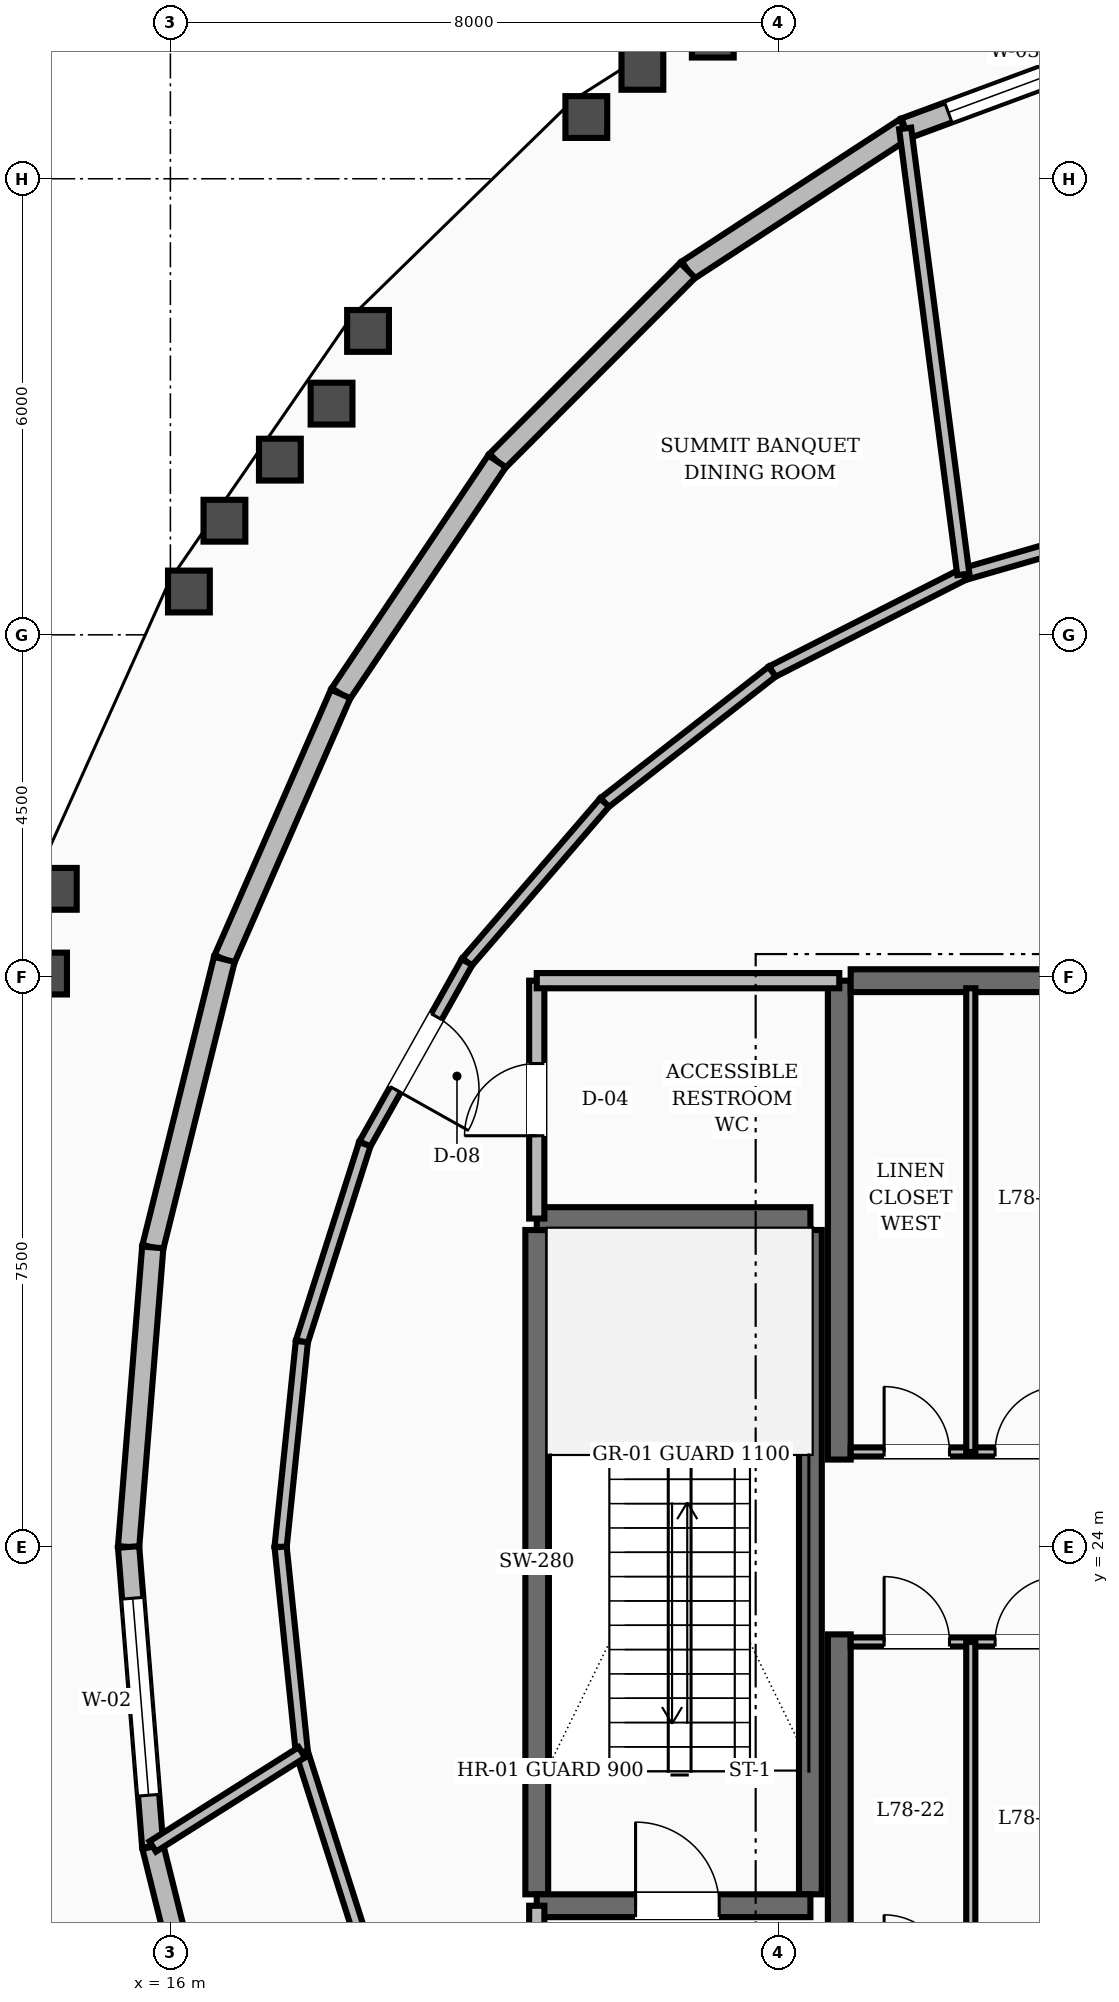
"""IFC4 building model, lengths in metres.
Left out: names, types, materials, properties, quantities, classifications, styles, units other than length and angle.
Written with IfcOpenShell. Run it as: python <this file> out.ifc"""

import sys

from ifc_helpers import new_model, si_unit, direction, frame, frame_2d, origin, place, context, subcontext, project, spatial, rectangle, extrude, element, fill, save


model = new_model("IFC4")
c1 = context("Model", 3, precision=1e-05, world=origin(), true_north=direction((0.0, 1.0)))
c2 = subcontext(c1, "Body", "Model", "MODEL_VIEW")
j1 = project(units=[si_unit("LENGTHUNIT", "METRE"), si_unit("PLANEANGLEUNIT", "RADIAN")], contexts=[c1])
p1 = place(None, origin())
s1 = spatial("IfcSite", under=j1, at=p1, CompositionType="ELEMENT")
p2 = place(p1, origin())
s2 = spatial("IfcBuilding", under=s1, at=p2, CompositionType="ELEMENT")
p3 = place(p2, frame((0.0, 0.0, 297.6)))
s3 = spatial("IfcBuildingStorey", under=s2, at=p3, CompositionType="ELEMENT", Elevation=297.6)
for number, where, z_axis, x_axis in (
    (1, (24.8, 16.55, 0.0), (0.0, 0.0, 1.0), (0.0, 1.0, 0.0)),
    (2, (24.8, 25.15, 0.0), (0.0, 0.0, 1.0), (0.0, 1.0, 0.0)),
):
    element("IfcWall", number, at=place(p3, frame(where, z_axis=z_axis, x_axis=x_axis)), inside=s3, PredefinedType="SHEAR", context=c2, shape_type="SweptSolid", body=[
        extrude(rectangle(XDim=6.3, YDim=0.3, at=frame_2d((3.15, 0.0))), origin(), (0.0, 0.0, 1.0), 4.8),
    ])
p4 = place(p3, frame((24.95, 31.45, 0.0), z_axis=(0.0, 0.0, 1.0), x_axis=(1.0, 0.0, 0.0)))
e3 = element("IfcWall", 3, at=p4, inside=s3, PredefinedType="SHEAR", context=c2, shape_type="SweptSolid", body=[
    extrude(rectangle(XDim=3.25, YDim=0.3, at=frame_2d((1.625, 0.0))), origin(), (0.0, 0.0, 1.0), 4.8),
])
for number, where, z_axis, x_axis in (
    (4, (20.82, 19.43, 0.0), (0.0, 0.0, 1.0), (0.0, 1.0, 0.0)),
    (5, (24.42, 19.43, 0.0), (0.0, 0.0, 1.0), (0.0, 1.0, 0.0)),
):
    element("IfcWall", number, at=place(p3, frame(where, z_axis=z_axis, x_axis=x_axis)), inside=s3, PredefinedType="SHEAR", context=c2, shape_type="SweptSolid", body=[
        extrude(rectangle(XDim=8.74, YDim=0.3, at=frame_2d((4.37, 0.0))), origin(), (0.0, 0.0, 1.0), 4.8),
    ])
p5 = place(p3, frame((20.82, 19.28, 0.0), z_axis=(0.0, 0.0, 1.0), x_axis=(1.0, 0.0, 0.0)))
e6 = element("IfcWall", 6, at=p5, inside=s3, PredefinedType="SHEAR", context=c2, shape_type="SweptSolid", body=[
    extrude(rectangle(XDim=3.6, YDim=0.3, at=frame_2d((1.8, 0.0))), origin(), (0.0, 0.0, 1.0), 4.8),
])
p6 = place(p5, frame((1.3, 0.0, 0.0)))
e7 = element("IfcOpeningElement", 7, at=p6, cuts=e6, PredefinedType="OPENING", context=c2, shape_type="SweptSolid", body=[
    extrude(rectangle(XDim=1.1, YDim=2.1, at=frame_2d((0.55, 1.05))), frame((0.0, 0.16, 0.0), z_axis=(0.0, -1.0, 0.0), x_axis=(1.0, 0.0, 0.0)), (0.0, 0.0, 1.0), 0.32),
])
p7 = place(p3, frame((20.82, 28.32, 0.0), z_axis=(0.0, 0.0, 1.0), x_axis=(1.0, 0.0, 0.0)))
e8 = element("IfcWall", 8, at=p7, inside=s3, PredefinedType="SHEAR", context=c2, shape_type="SweptSolid", body=[
    extrude(rectangle(XDim=3.6, YDim=0.3, at=frame_2d((1.8, 0.0))), origin(), (0.0, 0.0, 1.0), 4.8),
])
p8 = place(p3, frame((28.771, 43.812, 0.0), z_axis=(0.0, 0.0, 1.0), x_axis=(-0.937772775671, -0.347249508582, 0.0)))
e9 = element("IfcWall", 9, at=p8, inside=s3, PredefinedType="STANDARD", context=c2, shape_type="SweptSolid", body=[
    extrude(rectangle(XDim=3.311, YDim=0.28, at=frame_2d((1.655, 0.0))), origin(), (0.0, 0.0, 1.0), 3.71),
])
p9 = place(p8, frame((0.605, 0.0, 0.8)))
e10 = element("IfcOpeningElement", 10, at=p9, cuts=e9, PredefinedType="OPENING", context=c2, shape_type="SweptSolid", body=[
    extrude(rectangle(XDim=2.1, YDim=1.65, at=frame_2d((1.05, 0.825))), frame((0.0, 0.15, 0.0), z_axis=(0.0, -1.0, 0.0), x_axis=(1.0, 0.0, 0.0)), (0.0, 0.0, 1.0), 0.3),
])
p10 = place(p3, frame((25.667, 42.662, 0.0), z_axis=(0.0, 0.0, 1.0), x_axis=(-0.837506795295, -0.546426909875, 0.0)))
e11 = element("IfcWall", 11, at=p10, inside=s3, PredefinedType="STANDARD", context=c2, shape_type="SweptSolid", body=[
    extrude(rectangle(XDim=3.416, YDim=0.28, at=frame_2d((1.708, 0.0))), origin(), (0.0, 0.0, 1.0), 3.71),
])
p11 = place(p3, frame((22.805, 40.796, 0.0), z_axis=(0.0, 0.0, 1.0), x_axis=(-0.706556343152, -0.707656791073, 0.0)))
e12 = element("IfcWall", 12, at=p11, inside=s3, PredefinedType="STANDARD", context=c2, shape_type="SweptSolid", body=[
    extrude(rectangle(XDim=3.55, YDim=0.28, at=frame_2d((1.775, 0.0))), origin(), (0.0, 0.0, 1.0), 3.71),
])
p12 = place(p3, frame((20.297, 38.284, 0.0), z_axis=(0.0, 0.0, 1.0), x_axis=(-0.55793393731, -0.82988536654, 0.0)))
e13 = element("IfcWall", 13, at=p12, inside=s3, PredefinedType="STANDARD", context=c2, shape_type="SweptSolid", body=[
    extrude(rectangle(XDim=3.689, YDim=0.28, at=frame_2d((1.844, 0.0))), origin(), (0.0, 0.0, 1.0), 3.71),
])
p13 = place(p3, frame((18.239, 35.222, 0.0), z_axis=(0.0, 0.0, 1.0), x_axis=(-0.401195046879, -0.91599264973, 0.0)))
e14 = element("IfcWall", 14, at=p13, inside=s3, PredefinedType="STANDARD", context=c2, shape_type="SweptSolid", body=[
    extrude(rectangle(XDim=3.812, YDim=0.28, at=frame_2d((1.906, 0.0))), origin(), (0.0, 0.0, 1.0), 3.71),
])
p14 = place(p3, frame((16.71, 31.73, 0.0), z_axis=(0.0, 0.0, 1.0), x_axis=(-0.241167143082, -0.970483595481, 0.0)))
e15 = element("IfcWall", 15, at=p14, inside=s3, PredefinedType="STANDARD", context=c2, shape_type="SweptSolid", body=[
    extrude(rectangle(XDim=3.905, YDim=0.28, at=frame_2d((1.952, 0.0))), origin(), (0.0, 0.0, 1.0), 3.71),
])
p15 = place(p3, frame((15.768, 27.941, 0.0), z_axis=(0.0, 0.0, 1.0), x_axis=(-0.080459393336, -0.996757887365, 0.0)))
e16 = element("IfcWall", 16, at=p15, inside=s3, PredefinedType="STANDARD", context=c2, shape_type="SweptSolid", body=[
    extrude(rectangle(XDim=3.954, YDim=0.28, at=frame_2d((1.977, 0.0))), origin(), (0.0, 0.0, 1.0), 3.71),
])
p16 = place(p3, frame((15.45, 24.0, 0.0), z_axis=(0.0, 0.0, 1.0), x_axis=(0.080459393336, -0.996757887365, 0.0)))
e17 = element("IfcWall", 17, at=p16, inside=s3, PredefinedType="STANDARD", context=c2, shape_type="SweptSolid", body=[
    extrude(rectangle(XDim=3.954, YDim=0.28, at=frame_2d((1.977, 0.0))), origin(), (0.0, 0.0, 1.0), 3.71),
])
p17 = place(p16, frame((0.677, 0.0, 0.8)))
e18 = element("IfcOpeningElement", 18, at=p17, cuts=e17, PredefinedType="OPENING", context=c2, shape_type="SweptSolid", body=[
    extrude(rectangle(XDim=2.6, YDim=1.65, at=frame_2d((1.3, 0.825))), frame((0.0, 0.15, 0.0), z_axis=(0.0, -1.0, 0.0), x_axis=(1.0, 0.0, 0.0)), (0.0, 0.0, 1.0), 0.3),
])
p18 = place(p3, frame((15.768, 20.059, 0.0), z_axis=(0.0, 0.0, 1.0), x_axis=(0.241167143082, -0.970483595481, 0.0)))
e19 = element("IfcWall", 19, at=p18, inside=s3, PredefinedType="STANDARD", context=c2, shape_type="SweptSolid", body=[
    extrude(rectangle(XDim=3.905, YDim=0.28, at=frame_2d((1.952, 0.0))), origin(), (0.0, 0.0, 1.0), 3.71),
])
p19 = place(p3, frame((20.82, 16.55, 0.0), z_axis=(0.0, 0.0, 1.0), x_axis=(0.0, 1.0, 0.0)))
e20 = element("IfcWall", 20, at=p19, inside=s3, PredefinedType="SOLIDWALL", context=c2, shape_type="SweptSolid", body=[
    extrude(rectangle(XDim=2.73, YDim=0.2, at=frame_2d((1.365, 0.0))), origin(), (0.0, 0.0, 1.0), 3.71),
])
p20 = place(p19, frame((0.815, 0.0, 0.0)))
e21 = element("IfcOpeningElement", 21, at=p20, cuts=e20, PredefinedType="OPENING", context=c2, shape_type="SweptSolid", body=[
    extrude(rectangle(XDim=1.1, YDim=2.1, at=frame_2d((0.55, 1.05))), frame((0.0, 0.11, 0.0), z_axis=(0.0, -1.0, 0.0), x_axis=(1.0, 0.0, 0.0)), (0.0, 0.0, 1.0), 0.22),
])
p21 = place(p3, frame((20.82, 28.32, 0.0), z_axis=(0.0, 0.0, 1.0), x_axis=(0.0, 1.0, 0.0)))
e22 = element("IfcWall", 22, at=p21, inside=s3, PredefinedType="SOLIDWALL", context=c2, shape_type="SweptSolid", body=[
    extrude(rectangle(XDim=3.13, YDim=0.2, at=frame_2d((1.565, 0.0))), origin(), (0.0, 0.0, 1.0), 3.71),
])
p22 = place(p21, frame((1.09, 0.0, 0.0)))
e23 = element("IfcOpeningElement", 23, at=p22, cuts=e22, PredefinedType="OPENING", context=c2, shape_type="SweptSolid", body=[
    extrude(rectangle(XDim=0.95, YDim=2.1, at=frame_2d((0.475, 1.05))), frame((0.0, 0.11, 0.0), z_axis=(0.0, -1.0, 0.0), x_axis=(1.0, 0.0, 0.0)), (0.0, 0.0, 1.0), 0.22),
])
p23 = place(p3, frame((20.82, 31.45, 0.0), z_axis=(0.0, 0.0, 1.0), x_axis=(1.0, 0.0, 0.0)))
e24 = element("IfcWall", 24, at=p23, inside=s3, PredefinedType="SOLIDWALL", context=c2, shape_type="SweptSolid", body=[
    extrude(rectangle(XDim=3.98, YDim=0.2, at=frame_2d((1.99, 0.0))), origin(), (0.0, 0.0, 1.0), 3.71),
])
p24 = place(p3, frame((24.95, 25.25, 0.0), z_axis=(0.0, 0.0, 1.0), x_axis=(1.0, 0.0, 0.0)))
e25 = element("IfcWall", 25, at=p24, inside=s3, PredefinedType="PARTITIONING", context=c2, shape_type="SweptSolid", body=[
    extrude(rectangle(XDim=3.2, YDim=0.12, at=frame_2d((1.6, 0.0))), origin(), (0.0, 0.0, 1.0), 3.71),
])
p25 = place(p24, frame((0.44, 0.0, 0.0)))
e26 = element("IfcOpeningElement", 26, at=p25, cuts=e25, PredefinedType="OPENING", context=c2, shape_type="SweptSolid", body=[
    extrude(rectangle(XDim=0.86, YDim=2.1, at=frame_2d((0.43, 1.05))), frame((0.0, 0.07, 0.0), z_axis=(0.0, -1.0, 0.0), x_axis=(1.0, 0.0, 0.0)), (0.0, 0.0, 1.0), 0.14),
])
p26 = place(p24, frame((1.9, 0.0, 0.0)))
e27 = element("IfcOpeningElement", 27, at=p26, cuts=e25, PredefinedType="OPENING", context=c2, shape_type="SweptSolid", body=[
    extrude(rectangle(XDim=0.86, YDim=2.1, at=frame_2d((0.43, 1.05))), frame((0.0, 0.07, 0.0), z_axis=(0.0, -1.0, 0.0), x_axis=(1.0, 0.0, 0.0)), (0.0, 0.0, 1.0), 0.14),
])
p27 = place(p3, frame((24.95, 22.75, 0.0), z_axis=(0.0, 0.0, 1.0), x_axis=(1.0, 0.0, 0.0)))
e28 = element("IfcWall", 28, at=p27, inside=s3, PredefinedType="PARTITIONING", context=c2, shape_type="SweptSolid", body=[
    extrude(rectangle(XDim=3.2, YDim=0.12, at=frame_2d((1.6, 0.0))), origin(), (0.0, 0.0, 1.0), 3.71),
])
p28 = place(p27, frame((0.44, 0.0, 0.0)))
e29 = element("IfcOpeningElement", 29, at=p28, cuts=e28, PredefinedType="OPENING", context=c2, shape_type="SweptSolid", body=[
    extrude(rectangle(XDim=0.86, YDim=2.1, at=frame_2d((0.43, 1.05))), frame((0.0, 0.07, 0.0), z_axis=(0.0, -1.0, 0.0), x_axis=(1.0, 0.0, 0.0)), (0.0, 0.0, 1.0), 0.14),
])
p29 = place(p27, frame((1.9, 0.0, 0.0)))
e30 = element("IfcOpeningElement", 30, at=p29, cuts=e28, PredefinedType="OPENING", context=c2, shape_type="SweptSolid", body=[
    extrude(rectangle(XDim=0.86, YDim=2.1, at=frame_2d((0.43, 1.05))), frame((0.0, 0.07, 0.0), z_axis=(0.0, -1.0, 0.0), x_axis=(1.0, 0.0, 0.0)), (0.0, 0.0, 1.0), 0.14),
])
p30 = place(p3, frame((26.53, 25.25, 0.0), z_axis=(0.0, 0.0, 1.0), x_axis=(0.0, 1.0, 0.0)))
e31 = element("IfcWall", 31, at=p30, inside=s3, PredefinedType="PARTITIONING", context=c2, shape_type="SweptSolid", body=[
    extrude(rectangle(XDim=6.1, YDim=0.12, at=frame_2d((3.05, 0.0))), origin(), (0.0, 0.0, 1.0), 3.71),
])
p31 = place(p3, frame((26.53, 18.3, 0.0), z_axis=(0.0, 0.0, 1.0), x_axis=(0.0, 1.0, 0.0)))
e32 = element("IfcWall", 32, at=p31, inside=s3, PredefinedType="PARTITIONING", context=c2, shape_type="SweptSolid", body=[
    extrude(rectangle(XDim=4.45, YDim=0.12, at=frame_2d((2.225, 0.0))), origin(), (0.0, 0.0, 1.0), 3.71),
])
p32 = place(p3, frame((29.161, 37.584, 0.0), z_axis=(0.0, 0.0, 1.0), x_axis=(-0.96073200199, -0.277477963723, 0.0)))
e33 = element("IfcWall", 33, at=p32, inside=s3, PredefinedType="SOLIDWALL", context=c2, shape_type="SweptSolid", body=[
    extrude(rectangle(XDim=2.841, YDim=0.16, at=frame_2d((1.42, 0.0))), origin(), (0.0, 0.0, 1.0), 3.71),
])
p33 = place(p3, frame((26.432, 36.796, 0.0), z_axis=(0.0, 0.0, 1.0), x_axis=(-0.891273737135, -0.453465682817, 0.0)))
e34 = element("IfcWall", 34, at=p33, inside=s3, PredefinedType="SOLIDWALL", context=c2, shape_type="SweptSolid", body=[
    extrude(rectangle(XDim=2.822, YDim=0.16, at=frame_2d((1.411, 0.0))), origin(), (0.0, 0.0, 1.0), 3.71),
])
p34 = place(p3, frame((23.917, 35.516, 0.0), z_axis=(0.0, 0.0, 1.0), x_axis=(-0.788044217139, -0.615618641558, 0.0)))
e35 = element("IfcWall", 35, at=p34, inside=s3, PredefinedType="SOLIDWALL", context=c2, shape_type="SweptSolid", body=[
    extrude(rectangle(XDim=2.798, YDim=0.16, at=frame_2d((1.399, 0.0))), origin(), (0.0, 0.0, 1.0), 3.71),
])
p35 = place(p3, frame((21.712, 33.793, 0.0), z_axis=(0.0, 0.0, 1.0), x_axis=(-0.652979703778, -0.757375406555, 0.0)))
e36 = element("IfcWall", 36, at=p35, inside=s3, PredefinedType="SOLIDWALL", context=c2, shape_type="SweptSolid", body=[
    extrude(rectangle(XDim=2.771, YDim=0.16, at=frame_2d((1.386, 0.0))), origin(), (0.0, 0.0, 1.0), 3.71),
])
p36 = place(p3, frame((19.902, 31.695, 0.0), z_axis=(0.0, 0.0, 1.0), x_axis=(-0.48962370511, -0.871933843474, 0.0)))
e37 = element("IfcWall", 37, at=p36, inside=s3, PredefinedType="SOLIDWALL", context=c2, shape_type="SweptSolid", body=[
    extrude(rectangle(XDim=2.746, YDim=0.16, at=frame_2d((1.373, 0.0))), origin(), (0.0, 0.0, 1.0), 3.71),
])
p37 = place(p36, frame((0.823, 0.0, 0.0)))
e38 = element("IfcOpeningElement", 38, at=p37, cuts=e37, PredefinedType="OPENING", context=c2, shape_type="SweptSolid", body=[
    extrude(rectangle(XDim=1.1, YDim=2.1, at=frame_2d((0.55, 1.05))), frame((0.0, 0.09, 0.0), z_axis=(0.0, -1.0, 0.0), x_axis=(1.0, 0.0, 0.0)), (0.0, 0.0, 1.0), 0.18),
])
p38 = place(p3, frame((18.558, 29.3, 0.0), z_axis=(0.0, 0.0, 1.0), x_axis=(-0.303658118342, -0.952781059407, 0.0)))
e39 = element("IfcWall", 39, at=p38, inside=s3, PredefinedType="SOLIDWALL", context=c2, shape_type="SweptSolid", body=[
    extrude(rectangle(XDim=2.727, YDim=0.16, at=frame_2d((1.364, 0.0))), origin(), (0.0, 0.0, 1.0), 3.71),
])
for number, where, z_axis, x_axis in (
    (40, (17.729, 26.702, 0.0), (0.0, 0.0, 1.0), (-0.103, -0.995, 0.0)),
    (41, (17.45, 24.0, 0.0), (0.0, 0.0, 1.0), (0.103, -0.995, 0.0)),
):
    element("IfcWall", number, at=place(p3, frame(where, z_axis=z_axis, x_axis=x_axis)), inside=s3, PredefinedType="SOLIDWALL", context=c2, shape_type="SweptSolid", body=[
        extrude(rectangle(XDim=2.716, YDim=0.16, at=frame_2d((1.358, 0.0))), origin(), (0.0, 0.0, 1.0), 3.71),
    ])
p39 = place(p3, frame((17.729, 21.298, 0.0), z_axis=(0.0, 0.0, 1.0), x_axis=(0.303658118342, -0.952781059407, 0.0)))
e42 = element("IfcWall", 42, at=p39, inside=s3, PredefinedType="SOLIDWALL", context=c2, shape_type="SweptSolid", body=[
    extrude(rectangle(XDim=2.727, YDim=0.16, at=frame_2d((1.364, 0.0))), origin(), (0.0, 0.0, 1.0), 3.71),
])
p40 = place(p3, frame((26.432, 36.796, 0.0), z_axis=(0.0, 0.0, 1.0), x_axis=(-0.129365645752, 0.991596959303, 0.0)))
e43 = element("IfcWall", 43, at=p40, inside=s3, PredefinedType="SOLIDWALL", context=c2, shape_type="SweptSolid", body=[
    extrude(rectangle(XDim=5.917, YDim=0.16, at=frame_2d((2.958, 0.0))), origin(), (0.0, 0.0, 1.0), 3.71),
])
p41 = place(p3, frame((17.729, 21.298, 0.0), z_axis=(0.0, 0.0, 1.0), x_axis=(-0.845446390163, -0.534060297495, 0.0)))
e44 = element("IfcWall", 44, at=p41, inside=s3, PredefinedType="SOLIDWALL", context=c2, shape_type="SweptSolid", body=[
    extrude(rectangle(XDim=2.32, YDim=0.16, at=frame_2d((1.16, 0.0))), origin(), (0.0, 0.0, 1.0), 3.71),
])
p42 = place(p9, origin())
e45 = element("IfcWindow", 45, at=p42, inside=s3, PartitioningType="SINGLE_PANEL", PredefinedType="WINDOW", context=c2, shape_type="SweptSolid", body=[
    extrude(rectangle(XDim=2.1, YDim=1.65, at=frame_2d((1.05, 0.825))), frame((0.0, 0.03, 0.0), z_axis=(0.0, -1.0, 0.0), x_axis=(1.0, 0.0, 0.0)), (0.0, 0.0, 1.0), 0.06),
])
fill(e10, e45)
p43 = place(p17, origin())
e46 = element("IfcWindow", 46, at=p43, inside=s3, PartitioningType="SINGLE_PANEL", PredefinedType="WINDOW", context=c2, shape_type="SweptSolid", body=[
    extrude(rectangle(XDim=2.6, YDim=1.65, at=frame_2d((1.3, 0.825))), frame((0.0, 0.03, 0.0), z_axis=(0.0, -1.0, 0.0), x_axis=(1.0, 0.0, 0.0)), (0.0, 0.0, 1.0), 0.06),
])
fill(e18, e46)
p44 = place(p6, origin())
e47 = element("IfcDoor", 47, at=p44, inside=s3, OperationType="SINGLE_SWING_LEFT", PredefinedType="DOOR", context=c2, shape_type="SweptSolid", body=[
    extrude(rectangle(XDim=1.1, YDim=2.1, at=frame_2d((0.55, 1.05))), frame((0.0, 0.025, 0.0), z_axis=(0.0, -1.0, 0.0), x_axis=(1.0, 0.0, 0.0)), (0.0, 0.0, 1.0), 0.05),
])
fill(e7, e47)
p45 = place(p22, origin())
e48 = element("IfcDoor", 48, at=p45, inside=s3, OperationType="SINGLE_SWING_LEFT", PredefinedType="DOOR", context=c2, shape_type="SweptSolid", body=[
    extrude(rectangle(XDim=0.95, YDim=2.1, at=frame_2d((0.475, 1.05))), frame((0.0, 0.025, 0.0), z_axis=(0.0, -1.0, 0.0), x_axis=(1.0, 0.0, 0.0)), (0.0, 0.0, 1.0), 0.05),
])
fill(e23, e48)
p46 = place(p25, origin())
e49 = element("IfcDoor", 49, at=p46, inside=s3, OperationType="SINGLE_SWING_LEFT", PredefinedType="DOOR", context=c2, shape_type="SweptSolid", body=[
    extrude(rectangle(XDim=0.86, YDim=2.1, at=frame_2d((0.43, 1.05))), frame((0.0, 0.025, 0.0), z_axis=(0.0, -1.0, 0.0), x_axis=(1.0, 0.0, 0.0)), (0.0, 0.0, 1.0), 0.05),
])
fill(e26, e49)
p47 = place(p26, origin())
e50 = element("IfcDoor", 50, at=p47, inside=s3, OperationType="SINGLE_SWING_RIGHT", PredefinedType="DOOR", context=c2, shape_type="SweptSolid", body=[
    extrude(rectangle(XDim=0.86, YDim=2.1, at=frame_2d((0.43, 1.05))), frame((0.0, 0.025, 0.0), z_axis=(0.0, -1.0, 0.0), x_axis=(1.0, 0.0, 0.0)), (0.0, 0.0, 1.0), 0.05),
])
fill(e27, e50)
p48 = place(p28, origin())
e51 = element("IfcDoor", 51, at=p48, inside=s3, OperationType="SINGLE_SWING_LEFT", PredefinedType="DOOR", context=c2, shape_type="SweptSolid", body=[
    extrude(rectangle(XDim=0.86, YDim=2.1, at=frame_2d((0.43, 1.05))), frame((0.0, 0.025, 0.0), z_axis=(0.0, -1.0, 0.0), x_axis=(1.0, 0.0, 0.0)), (0.0, 0.0, 1.0), 0.05),
])
fill(e29, e51)
p49 = place(p29, origin())
e52 = element("IfcDoor", 52, at=p49, inside=s3, OperationType="SINGLE_SWING_RIGHT", PredefinedType="DOOR", context=c2, shape_type="SweptSolid", body=[
    extrude(rectangle(XDim=0.86, YDim=2.1, at=frame_2d((0.43, 1.05))), frame((0.0, 0.025, 0.0), z_axis=(0.0, -1.0, 0.0), x_axis=(1.0, 0.0, 0.0)), (0.0, 0.0, 1.0), 0.05),
])
fill(e30, e52)
p50 = place(p37, origin())
e53 = element("IfcDoor", 53, at=p50, inside=s3, OperationType="SINGLE_SWING_RIGHT", PredefinedType="DOOR", context=c2, shape_type="SweptSolid", body=[
    extrude(rectangle(XDim=1.1, YDim=2.1, at=frame_2d((0.55, 1.05))), frame((0.0, 0.025, 0.0), z_axis=(0.0, -1.0, 0.0), x_axis=(1.0, 0.0, 0.0)), (0.0, 0.0, 1.0), 0.05),
])
fill(e38, e53)
save(model, sys.argv[1])
